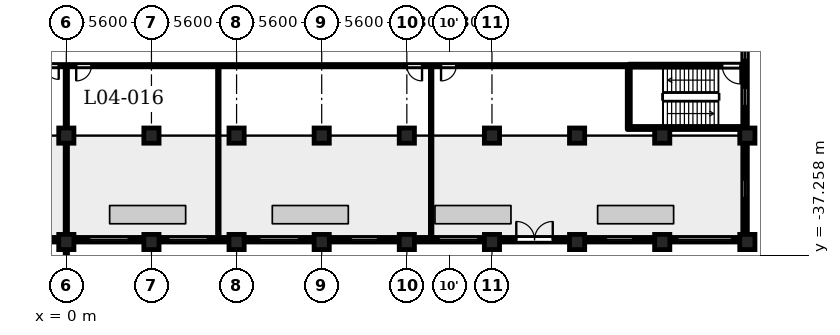
"""IFC4 building model, lengths in metres.
Left out: names, types, materials, properties, quantities, classifications, styles, units other than length and angle.
Written with IfcOpenShell. Run it as: python <this file> out.ifc"""

import sys

from ifc_helpers import new_model, si_unit, direction, frame, frame_2d, origin, origin_2d, place, context, subcontext, project, spatial, rectangle, circle, extrude, element, fill, save


model = new_model("IFC4")
c1 = context("Model", 3, precision=1e-05, world=origin(), true_north=direction((0.0, 1.0)))
c2 = subcontext(c1, "Body", "Model", "MODEL_VIEW")
j1 = project(units=[si_unit("LENGTHUNIT", "METRE"), si_unit("PLANEANGLEUNIT", "RADIAN")], contexts=[c1])
p1 = place(None, origin())
s1 = spatial("IfcSite", under=j1, at=p1, CompositionType="ELEMENT")
p2 = place(p1, origin())
s2 = spatial("IfcBuilding", under=s1, at=p2, CompositionType="ELEMENT")
p3 = place(p2, frame((0.0, 0.0, 20.9)))
s3 = spatial("IfcBuildingStorey", under=s2, at=p3, CompositionType="ELEMENT", Elevation=20.9)
for number, where, z_axis, x_axis in (
    (1, (0.0, -29.4, 0.0), (0.0, 0.0, 1.0), (1.0, 0.0, 0.0)),
    (2, (5.6, -29.4, 0.0), (0.0, 0.0, 1.0), (1.0, 0.0, 0.0)),
    (3, (11.2, -29.4, 0.0), (0.0, 0.0, 1.0), (1.0, 0.0, 0.0)),
    (4, (16.8, -29.4, 0.0), (0.0, 0.0, 1.0), (1.0, 0.0, 0.0)),
    (5, (22.4, -29.4, 0.0), (0.0, 0.0, 1.0), (1.0, 0.0, 0.0)),
    (6, (28.0, -29.4, 0.0), (0.0, 0.0, 1.0), (1.0, 0.0, 0.0)),
    (7, (33.6, -29.4, 0.0), (0.0, 0.0, 1.0), (1.0, 0.0, 0.0)),
    (8, (39.2, -29.4, 0.0), (0.0, 0.0, 1.0), (1.0, 0.0, 0.0)),
    (9, (44.8, -29.4, 0.0), (0.0, 0.0, 1.0), (1.0, 0.0, 0.0)),
    (10, (0.0, -36.4, 0.0), (0.0, 0.0, 1.0), (1.0, 0.0, 0.0)),
    (11, (5.6, -36.4, 0.0), (0.0, 0.0, 1.0), (1.0, 0.0, 0.0)),
    (12, (11.2, -36.4, 0.0), (0.0, 0.0, 1.0), (1.0, 0.0, 0.0)),
    (13, (16.8, -36.4, 0.0), (0.0, 0.0, 1.0), (1.0, 0.0, 0.0)),
    (14, (22.4, -36.4, 0.0), (0.0, 0.0, 1.0), (1.0, 0.0, 0.0)),
    (15, (28.0, -36.4, 0.0), (0.0, 0.0, 1.0), (1.0, 0.0, 0.0)),
    (16, (33.6, -36.4, 0.0), (0.0, 0.0, 1.0), (1.0, 0.0, 0.0)),
    (17, (39.2, -36.4, 0.0), (0.0, 0.0, 1.0), (1.0, 0.0, 0.0)),
    (18, (44.8, -36.4, 0.0), (0.0, 0.0, 1.0), (1.0, 0.0, 0.0)),
):
    element("IfcColumn", number, at=place(p3, frame(where, z_axis=z_axis, x_axis=x_axis)), inside=s3, PredefinedType="COLUMN", context=c2, shape_type="SweptSolid", body=[
        extrude(circle(Radius=0.5, at=origin_2d()), origin(), (0.0, 0.0, 1.0), 4.8),
    ])
p4 = place(p3, frame((44.65, -35.9, 0.0), z_axis=(0.0, 0.0, 1.0), x_axis=(0.0, 1.0, 0.0)))
e19 = element("IfcWall", 19, at=p4, inside=s3, PredefinedType="SOLIDWALL", context=c2, shape_type="SweptSolid", body=[
    extrude(rectangle(XDim=6.0, YDim=0.3, at=frame_2d((3.0, 0.0))), origin(), (0.0, 0.0, 1.0), 3.65),
])
p5 = place(p4, frame((2.4, 0.0, 0.6)))
e20 = element("IfcOpeningElement", 20, at=p5, cuts=e19, PredefinedType="OPENING", context=c2, shape_type="SweptSolid", body=[
    extrude(rectangle(XDim=1.2, YDim=1.55, at=frame_2d((0.6, 0.775))), frame((0.0, 0.16, 0.0), z_axis=(0.0, -1.0, 0.0), x_axis=(1.0, 0.0, 0.0)), (0.0, 0.0, 1.0), 0.32),
])
p6 = place(p3, frame((44.65, -28.9, 0.0), z_axis=(0.0, 0.0, 1.0), x_axis=(0.0, 1.0, 0.0)))
e21 = element("IfcWall", 21, at=p6, inside=s3, PredefinedType="SOLIDWALL", context=c2, shape_type="SweptSolid", body=[
    extrude(rectangle(XDim=6.0, YDim=0.3, at=frame_2d((3.0, 0.0))), origin(), (0.0, 0.0, 1.0), 3.65),
])
p7 = place(p6, frame((1.45, 0.0, 0.6)))
e22 = element("IfcOpeningElement", 22, at=p7, cuts=e21, PredefinedType="OPENING", context=c2, shape_type="SweptSolid", body=[
    extrude(rectangle(XDim=1.2, YDim=1.55, at=frame_2d((0.6, 0.775))), frame((0.0, 0.16, 0.0), z_axis=(0.0, -1.0, 0.0), x_axis=(1.0, 0.0, 0.0)), (0.0, 0.0, 1.0), 0.32),
])
p8 = place(p6, frame((4.488, 0.0, 0.6)))
e23 = element("IfcOpeningElement", 23, at=p8, cuts=e21, PredefinedType="OPENING", context=c2, shape_type="SweptSolid", body=[
    extrude(rectangle(XDim=1.2, YDim=1.55, at=frame_2d((0.6, 0.775))), frame((0.0, 0.16, 0.0), z_axis=(0.0, -1.0, 0.0), x_axis=(1.0, 0.0, 0.0)), (0.0, 0.0, 1.0), 0.32),
])
p9 = place(p3, frame((-5.1, -36.25, 0.0), z_axis=(0.0, 0.0, 1.0), x_axis=(1.0, 0.0, 0.0)))
e24 = element("IfcWall", 24, at=p9, inside=s3, PredefinedType="SOLIDWALL", context=c2, shape_type="SweptSolid", body=[
    extrude(rectangle(XDim=4.6, YDim=0.3, at=frame_2d((2.3, 0.0))), origin(), (0.0, 0.0, 1.0), 3.65),
])
p10 = place(p9, frame((1.4, 0.0, 0.9)))
e25 = element("IfcOpeningElement", 25, at=p10, cuts=e24, PredefinedType="OPENING", context=c2, shape_type="SweptSolid", body=[
    extrude(rectangle(XDim=1.8, YDim=1.25, at=frame_2d((0.9, 0.625))), frame((0.0, 0.16, 0.0), z_axis=(0.0, -1.0, 0.0), x_axis=(1.0, 0.0, 0.0)), (0.0, 0.0, 1.0), 0.32),
])
p11 = place(p3, frame((0.5, -36.25, 0.0), z_axis=(0.0, 0.0, 1.0), x_axis=(1.0, 0.0, 0.0)))
e26 = element("IfcWall", 26, at=p11, inside=s3, PredefinedType="SOLIDWALL", context=c2, shape_type="SweptSolid", body=[
    extrude(rectangle(XDim=4.6, YDim=0.3, at=frame_2d((2.3, 0.0))), origin(), (0.0, 0.0, 1.0), 3.65),
])
p12 = place(p11, frame((1.0, 0.0, 0.9)))
e27 = element("IfcOpeningElement", 27, at=p12, cuts=e26, PredefinedType="OPENING", context=c2, shape_type="SweptSolid", body=[
    extrude(rectangle(XDim=2.6, YDim=1.25, at=frame_2d((1.3, 0.625))), frame((0.0, 0.16, 0.0), z_axis=(0.0, -1.0, 0.0), x_axis=(1.0, 0.0, 0.0)), (0.0, 0.0, 1.0), 0.32),
])
p13 = place(p3, frame((6.1, -36.25, 0.0), z_axis=(0.0, 0.0, 1.0), x_axis=(1.0, 0.0, 0.0)))
e28 = element("IfcWall", 28, at=p13, inside=s3, PredefinedType="SOLIDWALL", context=c2, shape_type="SweptSolid", body=[
    extrude(rectangle(XDim=4.6, YDim=0.3, at=frame_2d((2.3, 0.0))), origin(), (0.0, 0.0, 1.0), 3.65),
])
p14 = place(p13, frame((0.613, 0.0, 0.9)))
e29 = element("IfcOpeningElement", 29, at=p14, cuts=e28, PredefinedType="OPENING", context=c2, shape_type="SweptSolid", body=[
    extrude(rectangle(XDim=2.6, YDim=1.25, at=frame_2d((1.3, 0.625))), frame((0.0, 0.16, 0.0), z_axis=(0.0, -1.0, 0.0), x_axis=(1.0, 0.0, 0.0)), (0.0, 0.0, 1.0), 0.32),
])
p15 = place(p3, frame((11.7, -36.25, 0.0), z_axis=(0.0, 0.0, 1.0), x_axis=(1.0, 0.0, 0.0)))
e30 = element("IfcWall", 30, at=p15, inside=s3, PredefinedType="SOLIDWALL", context=c2, shape_type="SweptSolid", body=[
    extrude(rectangle(XDim=4.6, YDim=0.3, at=frame_2d((2.3, 0.0))), origin(), (0.0, 0.0, 1.0), 3.65),
])
p16 = place(p15, frame((1.0, 0.0, 0.9)))
e31 = element("IfcOpeningElement", 31, at=p16, cuts=e30, PredefinedType="OPENING", context=c2, shape_type="SweptSolid", body=[
    extrude(rectangle(XDim=2.6, YDim=1.25, at=frame_2d((1.3, 0.625))), frame((0.0, 0.16, 0.0), z_axis=(0.0, -1.0, 0.0), x_axis=(1.0, 0.0, 0.0)), (0.0, 0.0, 1.0), 0.32),
])
p17 = place(p3, frame((17.3, -36.25, 0.0), z_axis=(0.0, 0.0, 1.0), x_axis=(1.0, 0.0, 0.0)))
e32 = element("IfcWall", 32, at=p17, inside=s3, PredefinedType="SOLIDWALL", context=c2, shape_type="SweptSolid", body=[
    extrude(rectangle(XDim=4.6, YDim=0.3, at=frame_2d((2.3, 0.0))), origin(), (0.0, 0.0, 1.0), 3.65),
])
p18 = place(p17, frame((1.4, 0.0, 0.9)))
e33 = element("IfcOpeningElement", 33, at=p18, cuts=e32, PredefinedType="OPENING", context=c2, shape_type="SweptSolid", body=[
    extrude(rectangle(XDim=1.8, YDim=1.25, at=frame_2d((0.9, 0.625))), frame((0.0, 0.16, 0.0), z_axis=(0.0, -1.0, 0.0), x_axis=(1.0, 0.0, 0.0)), (0.0, 0.0, 1.0), 0.32),
])
p19 = place(p3, frame((22.9, -36.25, 0.0), z_axis=(0.0, 0.0, 1.0), x_axis=(1.0, 0.0, 0.0)))
e34 = element("IfcWall", 34, at=p19, inside=s3, PredefinedType="SOLIDWALL", context=c2, shape_type="SweptSolid", body=[
    extrude(rectangle(XDim=4.6, YDim=0.3, at=frame_2d((2.3, 0.0))), origin(), (0.0, 0.0, 1.0), 3.65),
])
p20 = place(p19, frame((1.587, 0.0, 0.9)))
e35 = element("IfcOpeningElement", 35, at=p20, cuts=e34, PredefinedType="OPENING", context=c2, shape_type="SweptSolid", body=[
    extrude(rectangle(XDim=2.6, YDim=1.25, at=frame_2d((1.3, 0.625))), frame((0.0, 0.16, 0.0), z_axis=(0.0, -1.0, 0.0), x_axis=(1.0, 0.0, 0.0)), (0.0, 0.0, 1.0), 0.32),
])
p21 = place(p3, frame((28.5, -36.25, 0.0), z_axis=(0.0, 0.0, 1.0), x_axis=(1.0, 0.0, 0.0)))
e36 = element("IfcWall", 36, at=p21, inside=s3, PredefinedType="SOLIDWALL", context=c2, shape_type="SweptSolid", body=[
    extrude(rectangle(XDim=4.6, YDim=0.3, at=frame_2d((2.3, 0.0))), origin(), (0.0, 0.0, 1.0), 3.65),
])
p22 = place(p21, frame((1.1, 0.0, 0.0)))
e37 = element("IfcOpeningElement", 37, at=p22, cuts=e36, PredefinedType="OPENING", context=c2, shape_type="SweptSolid", body=[
    extrude(rectangle(XDim=2.4, YDim=2.3, at=frame_2d((1.2, 1.15))), frame((0.0, 0.16, 0.0), z_axis=(0.0, -1.0, 0.0), x_axis=(1.0, 0.0, 0.0)), (0.0, 0.0, 1.0), 0.32),
])
p23 = place(p3, frame((34.1, -36.25, 0.0), z_axis=(0.0, 0.0, 1.0), x_axis=(1.0, 0.0, 0.0)))
e38 = element("IfcWall", 38, at=p23, inside=s3, PredefinedType="SOLIDWALL", context=c2, shape_type="SweptSolid", body=[
    extrude(rectangle(XDim=4.6, YDim=0.3, at=frame_2d((2.3, 0.0))), origin(), (0.0, 0.0, 1.0), 3.65),
])
p24 = place(p23, frame((1.4, 0.0, 0.9)))
e39 = element("IfcOpeningElement", 39, at=p24, cuts=e38, PredefinedType="OPENING", context=c2, shape_type="SweptSolid", body=[
    extrude(rectangle(XDim=1.8, YDim=1.25, at=frame_2d((0.9, 0.625))), frame((0.0, 0.16, 0.0), z_axis=(0.0, -1.0, 0.0), x_axis=(1.0, 0.0, 0.0)), (0.0, 0.0, 1.0), 0.32),
])
p25 = place(p3, frame((39.7, -36.25, 0.0), z_axis=(0.0, 0.0, 1.0), x_axis=(1.0, 0.0, 0.0)))
e40 = element("IfcWall", 40, at=p25, inside=s3, PredefinedType="SOLIDWALL", context=c2, shape_type="SweptSolid", body=[
    extrude(rectangle(XDim=4.6, YDim=0.3, at=frame_2d((2.3, 0.0))), origin(), (0.0, 0.0, 1.0), 3.65),
])
p26 = place(p25, frame((0.5, 0.0, 1.2)))
e41 = element("IfcOpeningElement", 41, at=p26, cuts=e40, PredefinedType="OPENING", context=c2, shape_type="SweptSolid", body=[
    extrude(rectangle(XDim=3.6, YDim=0.95, at=frame_2d((1.8, 0.475))), frame((0.0, 0.16, 0.0), z_axis=(0.0, -1.0, 0.0), x_axis=(1.0, 0.0, 0.0)), (0.0, 0.0, 1.0), 0.32),
])
p27 = place(p3, frame((36.9, -28.9, 0.0), z_axis=(0.0, 0.0, 1.0), x_axis=(1.0, 0.0, 0.0)))
e42 = element("IfcWall", 42, at=p27, inside=s3, PredefinedType="SHEAR", context=c2, shape_type="SweptSolid", body=[
    extrude(rectangle(XDim=7.81, YDim=0.2, at=frame_2d((3.905, 0.0))), origin(), (0.0, 0.0, 1.0), 4.45),
])
p28 = place(p3, frame((-37.0, -24.8, 0.0), z_axis=(0.0, 0.0, 1.0), x_axis=(1.0, 0.0, 0.0)))
e43 = element("IfcWall", 43, at=p28, inside=s3, PredefinedType="PARTITIONING", context=c2, shape_type="SweptSolid", body=[
    extrude(rectangle(XDim=74.0, YDim=0.15, at=frame_2d((37.0, 0.0))), origin(), (0.0, 0.0, 1.0), 4.45),
])
p29 = place(p28, frame((11.9, 0.0, 0.0)))
e44 = element("IfcOpeningElement", 44, at=p29, cuts=e43, PredefinedType="OPENING", context=c2, shape_type="SweptSolid", body=[
    extrude(rectangle(XDim=1.8, YDim=2.1, at=frame_2d((0.9, 1.05))), frame((0.0, 0.085, 0.0), z_axis=(0.0, -1.0, 0.0), x_axis=(1.0, 0.0, 0.0)), (0.0, 0.0, 1.0), 0.17),
])
p30 = place(p28, frame((14.85, 0.0, 0.0)))
e45 = element("IfcOpeningElement", 45, at=p30, cuts=e43, PredefinedType="OPENING", context=c2, shape_type="SweptSolid", body=[
    extrude(rectangle(XDim=1.0, YDim=2.1, at=frame_2d((0.5, 1.05))), frame((0.0, 0.085, 0.0), z_axis=(0.0, -1.0, 0.0), x_axis=(1.0, 0.0, 0.0)), (0.0, 0.0, 1.0), 0.17),
])
p31 = place(p28, frame((35.6, 0.0, 0.0)))
e46 = element("IfcOpeningElement", 46, at=p31, cuts=e43, PredefinedType="OPENING", context=c2, shape_type="SweptSolid", body=[
    extrude(rectangle(XDim=0.9, YDim=2.1, at=frame_2d((0.45, 1.05))), frame((0.0, 0.085, 0.0), z_axis=(0.0, -1.0, 0.0), x_axis=(1.0, 0.0, 0.0)), (0.0, 0.0, 1.0), 0.17),
])
p32 = place(p28, frame((37.65, 0.0, 0.0)))
e47 = element("IfcOpeningElement", 47, at=p32, cuts=e43, PredefinedType="OPENING", context=c2, shape_type="SweptSolid", body=[
    extrude(rectangle(XDim=1.0, YDim=2.1, at=frame_2d((0.5, 1.05))), frame((0.0, 0.085, 0.0), z_axis=(0.0, -1.0, 0.0), x_axis=(1.0, 0.0, 0.0)), (0.0, 0.0, 1.0), 0.17),
])
p33 = place(p28, frame((59.4, 0.0, 0.0)))
e48 = element("IfcOpeningElement", 48, at=p33, cuts=e43, PredefinedType="OPENING", context=c2, shape_type="SweptSolid", body=[
    extrude(rectangle(XDim=1.0, YDim=2.1, at=frame_2d((0.5, 1.05))), frame((0.0, 0.085, 0.0), z_axis=(0.0, -1.0, 0.0), x_axis=(1.0, 0.0, 0.0)), (0.0, 0.0, 1.0), 0.17),
])
p34 = place(p28, frame((61.65, 0.0, 0.0)))
e49 = element("IfcOpeningElement", 49, at=p34, cuts=e43, PredefinedType="OPENING", context=c2, shape_type="SweptSolid", body=[
    extrude(rectangle(XDim=1.0, YDim=2.1, at=frame_2d((0.5, 1.05))), frame((0.0, 0.085, 0.0), z_axis=(0.0, -1.0, 0.0), x_axis=(1.0, 0.0, 0.0)), (0.0, 0.0, 1.0), 0.17),
])
p35 = place(p3, frame((37.0, -24.8, 0.0), z_axis=(0.0, 0.0, 1.0), x_axis=(1.0, 0.0, 0.0)))
e50 = element("IfcWall", 50, at=p35, inside=s3, PredefinedType="SHEAR", context=c2, shape_type="SweptSolid", body=[
    extrude(rectangle(XDim=7.71, YDim=0.2, at=frame_2d((3.855, 0.0))), origin(), (0.0, 0.0, 1.0), 4.45),
])
p36 = place(p35, frame((6.15, 0.0, 0.0)))
e51 = element("IfcOpeningElement", 51, at=p36, cuts=e50, PredefinedType="OPENING", context=c2, shape_type="SweptSolid", body=[
    extrude(rectangle(XDim=1.2, YDim=2.1, at=frame_2d((0.6, 1.05))), frame((0.0, 0.11, 0.0), z_axis=(0.0, -1.0, 0.0), x_axis=(1.0, 0.0, 0.0)), (0.0, 0.0, 1.0), 0.22),
])
p37 = place(p3, frame((0.0, -37.23, 0.0), z_axis=(0.0, 0.0, 1.0), x_axis=(0.0, 1.0, 0.0)))
e52 = element("IfcWall", 52, at=p37, inside=s3, PredefinedType="PARTITIONING", context=c2, shape_type="SweptSolid", body=[
    extrude(rectangle(XDim=12.355, YDim=0.15, at=frame_2d((6.177, 0.0))), origin(), (0.0, 0.0, 1.0), 4.45),
])
for number, where, z_axis, x_axis in (
    (53, (10.0, -36.08, 0.0), (0.0, 0.0, 1.0), (0.0, 1.0, 0.0)),
    (54, (24.0, -36.08, 0.0), (0.0, 0.0, 1.0), (0.0, 1.0, 0.0)),
):
    element("IfcWall", number, at=place(p3, frame(where, z_axis=z_axis, x_axis=x_axis)), inside=s3, PredefinedType="PARTITIONING", context=c2, shape_type="SweptSolid", body=[
        extrude(rectangle(XDim=11.205, YDim=0.1, at=frame_2d((5.603, 0.0))), origin(), (0.0, 0.0, 1.0), 4.45),
    ])
p38 = place(p3, frame((37.0, -28.8, 0.0), z_axis=(0.0, 0.0, 1.0), x_axis=(0.0, 1.0, 0.0)))
e55 = element("IfcWall", 55, at=p38, inside=s3, PredefinedType="SHEAR", context=c2, shape_type="SweptSolid", body=[
    extrude(rectangle(XDim=3.925, YDim=0.2, at=frame_2d((1.962, 0.0))), origin(), (0.0, 0.0, 1.0), 4.45),
])
p39 = place(p22, origin())
e56 = element("IfcDoor", 56, at=p39, inside=s3, OperationType="SINGLE_SWING_LEFT", PredefinedType="DOOR", context=c2, shape_type="SweptSolid", body=[
    extrude(rectangle(XDim=2.4, YDim=2.3, at=frame_2d((1.2, 1.15))), frame((0.0, 0.025, 0.0), z_axis=(0.0, -1.0, 0.0), x_axis=(1.0, 0.0, 0.0)), (0.0, 0.0, 1.0), 0.05),
])
fill(e37, e56)
p40 = place(p36, origin())
e57 = element("IfcDoor", 57, at=p40, inside=s3, OperationType="SINGLE_SWING_RIGHT", PredefinedType="DOOR", context=c2, shape_type="SweptSolid", body=[
    extrude(rectangle(XDim=1.2, YDim=2.1, at=frame_2d((0.6, 1.05))), frame((0.0, 0.025, 0.0), z_axis=(0.0, -1.0, 0.0), x_axis=(1.0, 0.0, 0.0)), (0.0, 0.0, 1.0), 0.05),
])
fill(e51, e57)
p41 = place(p31, origin())
e58 = element("IfcDoor", 58, at=p41, inside=s3, OperationType="SINGLE_SWING_RIGHT", PredefinedType="DOOR", context=c2, shape_type="SweptSolid", body=[
    extrude(rectangle(XDim=0.9, YDim=2.1, at=frame_2d((0.45, 1.05))), frame((0.0, 0.025, 0.0), z_axis=(0.0, -1.0, 0.0), x_axis=(1.0, 0.0, 0.0)), (0.0, 0.0, 1.0), 0.05),
])
fill(e46, e58)
p42 = place(p32, origin())
e59 = element("IfcDoor", 59, at=p42, inside=s3, OperationType="SINGLE_SWING_LEFT", PredefinedType="DOOR", context=c2, shape_type="SweptSolid", body=[
    extrude(rectangle(XDim=1.0, YDim=2.1, at=frame_2d((0.5, 1.05))), frame((0.0, 0.025, 0.0), z_axis=(0.0, -1.0, 0.0), x_axis=(1.0, 0.0, 0.0)), (0.0, 0.0, 1.0), 0.05),
])
fill(e47, e59)
p43 = place(p33, origin())
e60 = element("IfcDoor", 60, at=p43, inside=s3, OperationType="SINGLE_SWING_RIGHT", PredefinedType="DOOR", context=c2, shape_type="SweptSolid", body=[
    extrude(rectangle(XDim=1.0, YDim=2.1, at=frame_2d((0.5, 1.05))), frame((0.0, 0.025, 0.0), z_axis=(0.0, -1.0, 0.0), x_axis=(1.0, 0.0, 0.0)), (0.0, 0.0, 1.0), 0.05),
])
fill(e48, e60)
p44 = place(p34, origin())
e61 = element("IfcDoor", 61, at=p44, inside=s3, OperationType="SINGLE_SWING_LEFT", PredefinedType="DOOR", context=c2, shape_type="SweptSolid", body=[
    extrude(rectangle(XDim=1.0, YDim=2.1, at=frame_2d((0.5, 1.05))), frame((0.0, 0.025, 0.0), z_axis=(0.0, -1.0, 0.0), x_axis=(1.0, 0.0, 0.0)), (0.0, 0.0, 1.0), 0.05),
])
fill(e49, e61)
p45 = place(p5, origin())
e62 = element("IfcWindow", 62, at=p45, inside=s3, PartitioningType="SINGLE_PANEL", PredefinedType="WINDOW", context=c2, shape_type="SweptSolid", body=[
    extrude(rectangle(XDim=1.2, YDim=1.55, at=frame_2d((0.6, 0.775))), frame((0.0, 0.03, 0.0), z_axis=(0.0, -1.0, 0.0), x_axis=(1.0, 0.0, 0.0)), (0.0, 0.0, 1.0), 0.06),
])
fill(e20, e62)
p46 = place(p7, origin())
e63 = element("IfcWindow", 63, at=p46, inside=s3, PartitioningType="SINGLE_PANEL", PredefinedType="WINDOW", context=c2, shape_type="SweptSolid", body=[
    extrude(rectangle(XDim=1.2, YDim=1.55, at=frame_2d((0.6, 0.775))), frame((0.0, 0.03, 0.0), z_axis=(0.0, -1.0, 0.0), x_axis=(1.0, 0.0, 0.0)), (0.0, 0.0, 1.0), 0.06),
])
fill(e22, e63)
p47 = place(p8, origin())
e64 = element("IfcWindow", 64, at=p47, inside=s3, PartitioningType="SINGLE_PANEL", PredefinedType="WINDOW", context=c2, shape_type="SweptSolid", body=[
    extrude(rectangle(XDim=1.2, YDim=1.55, at=frame_2d((0.6, 0.775))), frame((0.0, 0.03, 0.0), z_axis=(0.0, -1.0, 0.0), x_axis=(1.0, 0.0, 0.0)), (0.0, 0.0, 1.0), 0.06),
])
fill(e23, e64)
p48 = place(p12, origin())
e65 = element("IfcWindow", 65, at=p48, inside=s3, PartitioningType="SINGLE_PANEL", PredefinedType="WINDOW", context=c2, shape_type="SweptSolid", body=[
    extrude(rectangle(XDim=2.6, YDim=1.25, at=frame_2d((1.3, 0.625))), frame((0.0, 0.03, 0.0), z_axis=(0.0, -1.0, 0.0), x_axis=(1.0, 0.0, 0.0)), (0.0, 0.0, 1.0), 0.06),
])
fill(e27, e65)
p49 = place(p14, origin())
e66 = element("IfcWindow", 66, at=p49, inside=s3, PartitioningType="SINGLE_PANEL", PredefinedType="WINDOW", context=c2, shape_type="SweptSolid", body=[
    extrude(rectangle(XDim=2.6, YDim=1.25, at=frame_2d((1.3, 0.625))), frame((0.0, 0.03, 0.0), z_axis=(0.0, -1.0, 0.0), x_axis=(1.0, 0.0, 0.0)), (0.0, 0.0, 1.0), 0.06),
])
fill(e29, e66)
p50 = place(p16, origin())
e67 = element("IfcWindow", 67, at=p50, inside=s3, PartitioningType="SINGLE_PANEL", PredefinedType="WINDOW", context=c2, shape_type="SweptSolid", body=[
    extrude(rectangle(XDim=2.6, YDim=1.25, at=frame_2d((1.3, 0.625))), frame((0.0, 0.03, 0.0), z_axis=(0.0, -1.0, 0.0), x_axis=(1.0, 0.0, 0.0)), (0.0, 0.0, 1.0), 0.06),
])
fill(e31, e67)
p51 = place(p18, origin())
e68 = element("IfcWindow", 68, at=p51, inside=s3, PartitioningType="SINGLE_PANEL", PredefinedType="WINDOW", context=c2, shape_type="SweptSolid", body=[
    extrude(rectangle(XDim=1.8, YDim=1.25, at=frame_2d((0.9, 0.625))), frame((0.0, 0.03, 0.0), z_axis=(0.0, -1.0, 0.0), x_axis=(1.0, 0.0, 0.0)), (0.0, 0.0, 1.0), 0.06),
])
fill(e33, e68)
p52 = place(p20, origin())
e69 = element("IfcWindow", 69, at=p52, inside=s3, PartitioningType="SINGLE_PANEL", PredefinedType="WINDOW", context=c2, shape_type="SweptSolid", body=[
    extrude(rectangle(XDim=2.6, YDim=1.25, at=frame_2d((1.3, 0.625))), frame((0.0, 0.03, 0.0), z_axis=(0.0, -1.0, 0.0), x_axis=(1.0, 0.0, 0.0)), (0.0, 0.0, 1.0), 0.06),
])
fill(e35, e69)
p53 = place(p24, origin())
e70 = element("IfcWindow", 70, at=p53, inside=s3, PartitioningType="SINGLE_PANEL", PredefinedType="WINDOW", context=c2, shape_type="SweptSolid", body=[
    extrude(rectangle(XDim=1.8, YDim=1.25, at=frame_2d((0.9, 0.625))), frame((0.0, 0.03, 0.0), z_axis=(0.0, -1.0, 0.0), x_axis=(1.0, 0.0, 0.0)), (0.0, 0.0, 1.0), 0.06),
])
fill(e39, e70)
p54 = place(p26, origin())
e71 = element("IfcWindow", 71, at=p54, inside=s3, PartitioningType="SINGLE_PANEL", PredefinedType="WINDOW", context=c2, shape_type="SweptSolid", body=[
    extrude(rectangle(XDim=3.6, YDim=0.95, at=frame_2d((1.8, 0.475))), frame((0.0, 0.03, 0.0), z_axis=(0.0, -1.0, 0.0), x_axis=(1.0, 0.0, 0.0)), (0.0, 0.0, 1.0), 0.06),
])
fill(e41, e71)
save(model, sys.argv[1])
